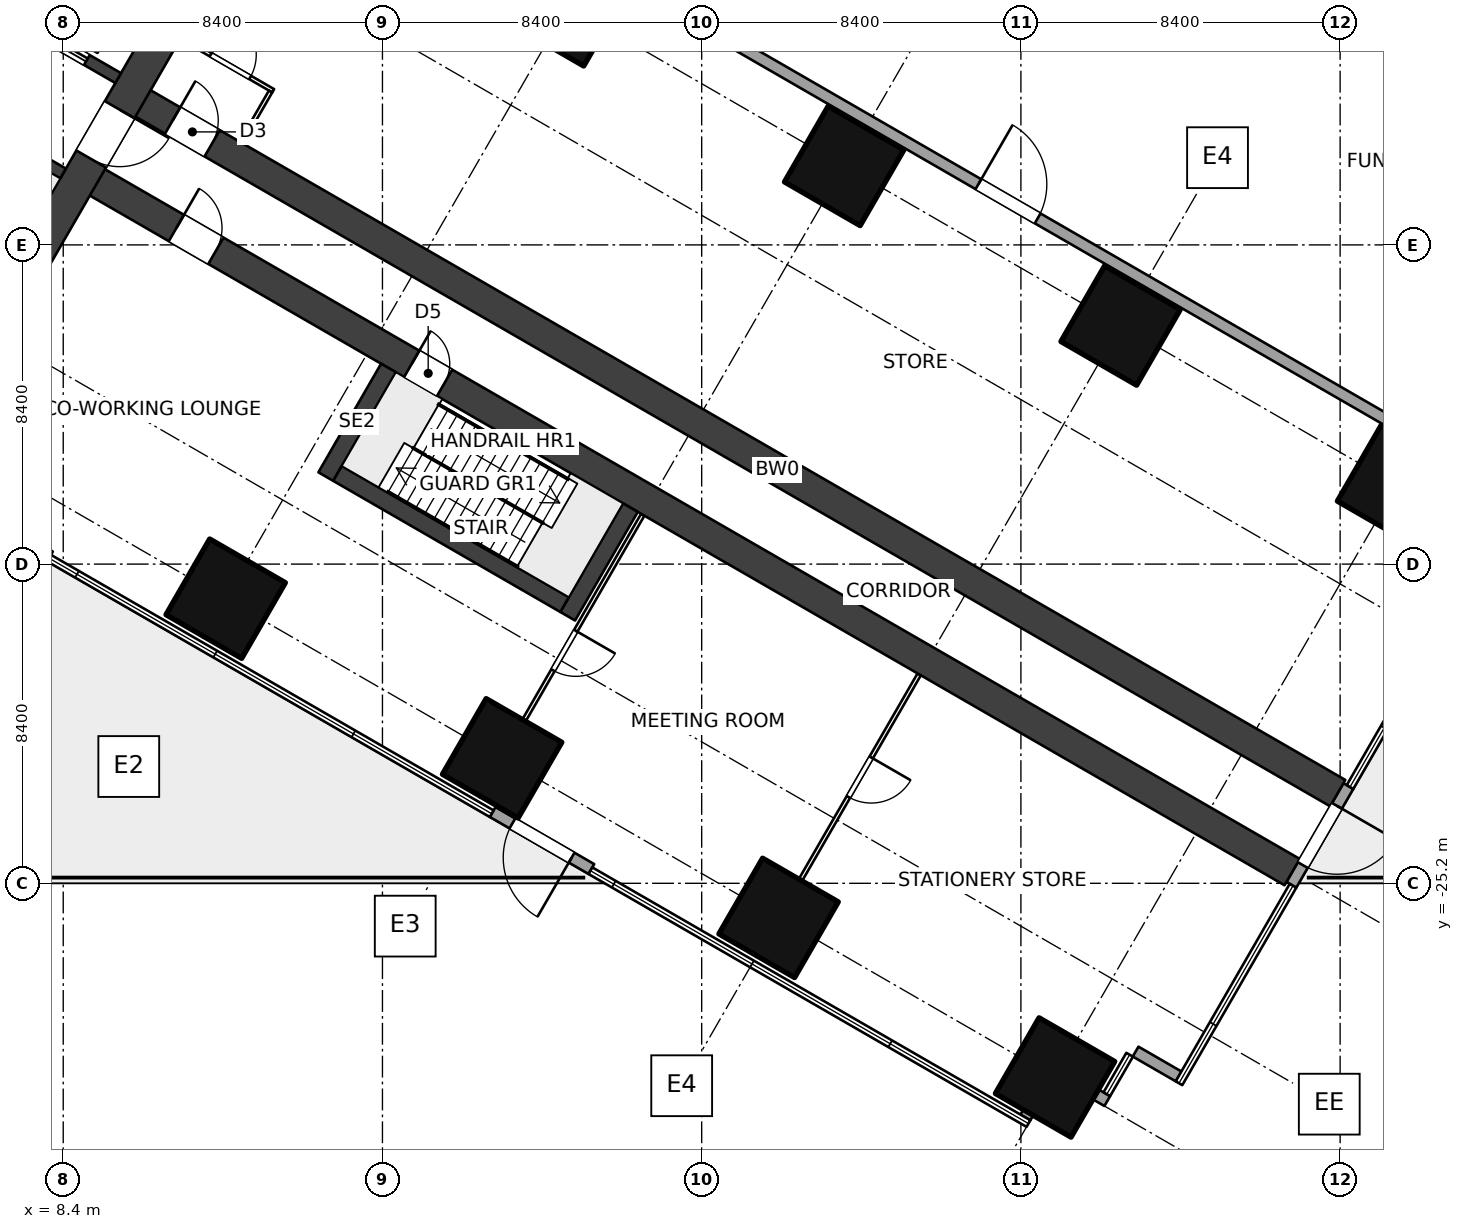
"""IFC4 building model, lengths in metres.
Left out: names, types, materials, properties, quantities, classifications, styles, units other than length and angle.
Written with IfcOpenShell. Run it as: python <this file> out.ifc"""

import sys

from ifc_helpers import new_model, si_unit, direction, frame, frame_2d, origin, origin_2d, place, context, subcontext, project, spatial, rectangle, extrude, element, fill, save


model = new_model("IFC4")
c1 = context("Model", 3, precision=1e-05, world=origin(), true_north=direction((0.0, 1.0)))
c2 = subcontext(c1, "Body", "Model", "MODEL_VIEW")
j1 = project(units=[si_unit("LENGTHUNIT", "METRE"), si_unit("PLANEANGLEUNIT", "RADIAN")], contexts=[c1])
p1 = place(None, origin())
s1 = spatial("IfcSite", under=j1, at=p1, CompositionType="ELEMENT")
p2 = place(p1, origin())
s2 = spatial("IfcBuilding", under=s1, at=p2, CompositionType="ELEMENT")
p3 = place(p2, frame((0.0, 0.0, 16.0)))
s3 = spatial("IfcBuildingStorey", under=s2, at=p3, CompositionType="ELEMENT", Elevation=16.0)
for number, where, z_axis, x_axis in (
    (1, (21.675, -2.122, 0.0), (0.0, 0.0, 1.0), (-0.5, -0.866, 0.0)),
    (2, (12.675, -17.71, 0.0), (0.0, 0.0, 1.0), (-0.5, -0.866, 0.0)),
    (3, (28.949, -6.322, 0.0), (0.0, 0.0, 1.0), (-0.5, -0.866, 0.0)),
    (4, (19.949, -21.91, 0.0), (0.0, 0.0, 1.0), (-0.5, -0.866, 0.0)),
    (5, (36.224, -10.521, 0.0), (0.0, 0.0, 1.0), (-0.5, -0.866, 0.0)),
    (6, (27.224, -26.11, 0.0), (0.0, 0.0, 1.0), (-0.5, -0.866, 0.0)),
    (7, (43.499, -14.721, 0.0), (0.0, 0.0, 1.0), (-0.5, -0.866, 0.0)),
    (8, (34.499, -30.31, 0.0), (0.0, 0.0, 1.0), (-0.5, -0.866, 0.0)),
):
    element("IfcColumn", number, at=place(p3, frame(where, z_axis=z_axis, x_axis=x_axis)), inside=s3, PredefinedType="COLUMN", context=c2, shape_type="SweptSolid", body=[
        extrude(rectangle(XDim=2.3, YDim=2.3, at=origin_2d()), origin(), (0.0, 0.0, 1.0), 5.0),
    ])
p4 = place(p3, frame((12.551, -0.225, 0.0), z_axis=(0.0, 0.0, 1.0), x_axis=(-0.499997612506, -0.8660267822, 0.0)))
e9 = element("IfcWall", 9, at=p4, inside=s3, PredefinedType="SHEAR", context=c2, shape_type="SweptSolid", body=[
    extrude(rectangle(XDim=12.161, YDim=0.9, at=frame_2d((6.08, 0.0))), origin(), (0.0, 0.0, 1.0), 5.0),
])
p5 = place(p4, frame((5.33, 0.0, 0.0)))
e10 = element("IfcOpeningElement", 10, at=p5, cuts=e9, PredefinedType="OPENING", context=c2, shape_type="SweptSolid", body=[
    extrude(rectangle(XDim=1.5, YDim=2.1, at=frame_2d((0.75, 1.05))), frame((0.0, 0.46, 0.0), z_axis=(0.0, -1.0, 0.0), x_axis=(1.0, 0.0, 0.0)), (0.0, 0.0, 1.0), 0.92),
])
p6 = place(p3, frame((2.419, -3.071, 0.0), z_axis=(0.0, 0.0, 1.0), x_axis=(0.86602711848, -0.499997030048, 0.0)))
e11 = element("IfcWall", 11, at=p6, inside=s3, PredefinedType="SHEAR", context=c2, shape_type="SweptSolid", body=[
    extrude(rectangle(XDim=6.901, YDim=0.3, at=frame_2d((3.451, 0.0))), origin(), (0.0, 0.0, 1.0), 5.0),
])
p7 = place(p6, frame((0.25, 0.0, 0.0)))
e12 = element("IfcOpeningElement", 12, at=p7, cuts=e11, PredefinedType="OPENING", context=c2, shape_type="SweptSolid", body=[
    extrude(rectangle(XDim=1.0, YDim=2.1, at=frame_2d((0.5, 1.05))), frame((0.0, 0.16, 0.0), z_axis=(0.0, -1.0, 0.0), x_axis=(1.0, 0.0, 0.0)), (0.0, 0.0, 1.0), 0.32),
])
p8 = place(p3, frame((3.869, -0.559, 0.0), z_axis=(0.0, 0.0, 1.0), x_axis=(0.86602711848, -0.499997030048, 0.0)))
e13 = element("IfcWall", 13, at=p8, inside=s3, PredefinedType="SHEAR", context=c2, shape_type="SweptSolid", body=[
    extrude(rectangle(XDim=6.901, YDim=0.3, at=frame_2d((3.451, 0.0))), origin(), (0.0, 0.0, 1.0), 5.0),
])
p9 = place(p8, frame((4.85, 0.0, 0.0)))
e14 = element("IfcOpeningElement", 14, at=p9, cuts=e13, PredefinedType="OPENING", context=c2, shape_type="SweptSolid", body=[
    extrude(rectangle(XDim=1.1, YDim=2.1, at=frame_2d((0.55, 1.05))), frame((0.0, 0.16, 0.0), z_axis=(0.0, -1.0, 0.0), x_axis=(1.0, 0.0, 0.0)), (0.0, 0.0, 1.0), 0.32),
])
p10 = place(p3, frame((10.11, -4.451, 0.0), z_axis=(0.0, 0.0, 1.0), x_axis=(0.866025284237, -0.500000207062, 0.0)))
e15 = element("IfcWall", 15, at=p10, inside=s3, PredefinedType="SHEAR", context=c2, shape_type="SweptSolid", body=[
    extrude(rectangle(XDim=36.75, YDim=0.8, at=frame_2d((18.375, 0.0))), origin(), (0.0, 0.0, 1.0), 5.0),
])
p11 = place(p10, frame((1.35, 0.0, 0.0)))
e16 = element("IfcOpeningElement", 16, at=p11, cuts=e15, PredefinedType="OPENING", context=c2, shape_type="SweptSolid", body=[
    extrude(rectangle(XDim=1.2, YDim=2.1, at=frame_2d((0.6, 1.05))), frame((0.0, 0.41, 0.0), z_axis=(0.0, -1.0, 0.0), x_axis=(1.0, 0.0, 0.0)), (0.0, 0.0, 1.0), 0.82),
])
p12 = place(p3, frame((8.91, -6.53, 0.0), z_axis=(0.0, 0.0, 1.0), x_axis=(0.866025284237, -0.500000207062, 0.0)))
e17 = element("IfcWall", 17, at=p12, inside=s3, PredefinedType="SHEAR", context=c2, shape_type="SweptSolid", body=[
    extrude(rectangle(XDim=36.75, YDim=0.8, at=frame_2d((18.375, 0.0))), origin(), (0.0, 0.0, 1.0), 5.0),
])
p13 = place(p12, frame((10.0, 0.0, 0.0)))
e18 = element("IfcOpeningElement", 18, at=p13, cuts=e17, PredefinedType="OPENING", context=c2, shape_type="SweptSolid", body=[
    extrude(rectangle(XDim=1.0, YDim=2.1, at=frame_2d((0.5, 1.05))), frame((0.0, 0.41, 0.0), z_axis=(0.0, -1.0, 0.0), x_axis=(1.0, 0.0, 0.0)), (0.0, 0.0, 1.0), 0.82),
])
p14 = place(p12, frame((2.85, 0.0, 0.0)))
e19 = element("IfcOpeningElement", 19, at=p14, cuts=e17, PredefinedType="OPENING", context=c2, shape_type="SweptSolid", body=[
    extrude(rectangle(XDim=1.2, YDim=2.1, at=frame_2d((0.6, 1.05))), frame((0.0, 0.41, 0.0), z_axis=(0.0, -1.0, 0.0), x_axis=(1.0, 0.0, 0.0)), (0.0, 0.0, 1.0), 0.82),
])
p15 = place(p3, frame((42.217, -22.642, 0.0), z_axis=(0.0, 0.0, 1.0), x_axis=(-0.50002537861, -0.866010750942, 0.0)))
e20 = element("IfcWall", 20, at=p15, inside=s3, PredefinedType="SOLIDWALL", context=c2, shape_type="SweptSolid", body=[
    extrude(rectangle(XDim=3.0, YDim=0.3, at=frame_2d((1.5, 0.0))), origin(), (0.0, 0.0, 1.0), 4.7),
])
p16 = place(p15, frame((0.6, 0.0, 0.0)))
e21 = element("IfcOpeningElement", 21, at=p16, cuts=e20, PredefinedType="OPENING", context=c2, shape_type="SweptSolid", body=[
    extrude(rectangle(XDim=1.8, YDim=2.4, at=frame_2d((0.9, 1.2))), frame((0.0, 0.16, 0.0), z_axis=(0.0, -1.0, 0.0), x_axis=(1.0, 0.0, 0.0)), (0.0, 0.0, 1.0), 0.32),
])
p17 = place(p3, frame((37.753, -30.283, 0.0), z_axis=(0.0, 0.0, 1.0), x_axis=(-0.866101796549, 0.4998676605, 0.0)))
e22 = element("IfcWall", 22, at=p17, inside=s3, PredefinedType="SOLIDWALL", context=c2, shape_type="SweptSolid", body=[
    extrude(rectangle(XDim=1.31, YDim=0.3, at=frame_2d((0.655, 0.0))), origin(), (0.0, 0.0, 1.0), 4.7),
])
p18 = place(p3, frame((35.873, -30.93, 0.0), z_axis=(0.0, 0.0, 1.0), x_axis=(-0.865939549016, 0.500148675346, 0.0)))
e23 = element("IfcWall", 23, at=p18, inside=s3, PredefinedType="SOLIDWALL", context=c2, shape_type="SweptSolid", body=[
    extrude(rectangle(XDim=0.347, YDim=0.3, at=frame_2d((0.174, 0.0))), origin(), (0.0, 0.0, 1.0), 4.7),
])
p19 = place(p3, frame((34.219, -30.495, 0.0), z_axis=(0.0, 0.0, 1.0), x_axis=(-0.499953773667, -0.866052090925, 0.0)))
e24 = element("IfcWall", 24, at=p19, inside=s3, PredefinedType="SOLIDWALL", context=c2, shape_type="SweptSolid", body=[
    extrude(rectangle(XDim=1.005, YDim=0.3, at=frame_2d((0.502, 0.0))), origin(), (0.0, 0.0, 1.0), 4.7),
])
p20 = place(p3, frame((22.298, -24.825, 0.0), z_axis=(0.0, 0.0, 1.0), x_axis=(-0.866031096941, 0.499990139034, 0.0)))
e25 = element("IfcWall", 25, at=p20, inside=s3, PredefinedType="SOLIDWALL", context=c2, shape_type="SweptSolid", body=[
    extrude(rectangle(XDim=3.0, YDim=0.3, at=frame_2d((1.5, 0.0))), origin(), (0.0, 0.0, 1.0), 4.7),
])
p21 = place(p20, frame((0.6, 0.0, 0.0)))
e26 = element("IfcOpeningElement", 26, at=p21, cuts=e25, PredefinedType="OPENING", context=c2, shape_type="SweptSolid", body=[
    extrude(rectangle(XDim=1.8, YDim=2.4, at=frame_2d((0.9, 1.2))), frame((0.0, 0.16, 0.0), z_axis=(0.0, -1.0, 0.0), x_axis=(1.0, 0.0, 0.0)), (0.0, 0.0, 1.0), 0.32),
])
p22 = place(p3, frame((11.5, -2.945, 0.0), z_axis=(0.0, 0.0, 1.0), x_axis=(0.866034573852, -0.49998411664, 0.0)))
e27 = element("IfcWall", 27, at=p22, inside=s3, PredefinedType="PARTITIONING", context=c2, shape_type="SweptSolid", body=[
    extrude(rectangle(XDim=2.8, YDim=0.1, at=frame_2d((1.4, 0.0))), origin(), (0.0, 0.0, 1.0), 4.7),
])
p23 = place(p22, frame((0.9, 0.0, 0.0)))
e28 = element("IfcOpeningElement", 28, at=p23, cuts=e27, PredefinedType="OPENING", context=c2, shape_type="SweptSolid", body=[
    extrude(rectangle(XDim=1.2, YDim=2.1, at=frame_2d((0.6, 1.05))), frame((0.0, 0.06, 0.0), z_axis=(0.0, -1.0, 0.0), x_axis=(1.0, 0.0, 0.0)), (0.0, 0.0, 1.0), 0.12),
])
p24 = place(p3, frame((13.082, -5.705, 0.0), z_axis=(0.0, 0.0, 1.0), x_axis=(0.500086022567, 0.865975732936, 0.0)))
e29 = element("IfcWall", 29, at=p24, inside=s3, PredefinedType="PARTITIONING", context=c2, shape_type="SweptSolid", body=[
    extrude(rectangle(XDim=1.55, YDim=0.1, at=frame_2d((0.775, 0.0))), origin(), (0.0, 0.0, 1.0), 4.7),
])
p25 = place(p3, frame((23.649, -15.501, 0.0), z_axis=(0.0, 0.0, 1.0), x_axis=(-0.500004234368, -0.866022959057, 0.0)))
e30 = element("IfcWall", 30, at=p25, inside=s3, PredefinedType="PARTITIONING", context=c2, shape_type="SweptSolid", body=[
    extrude(rectangle(XDim=6.25, YDim=0.1, at=frame_2d((3.125, 0.0))), origin(), (0.0, 0.0, 1.0), 2.9),
])
p26 = place(p25, frame((3.525, 0.0, 0.0)))
e31 = element("IfcOpeningElement", 31, at=p26, cuts=e30, PredefinedType="OPENING", context=c2, shape_type="SweptSolid", body=[
    extrude(rectangle(XDim=1.2, YDim=2.1, at=frame_2d((0.6, 1.05))), frame((0.0, 0.06, 0.0), z_axis=(0.0, -1.0, 0.0), x_axis=(1.0, 0.0, 0.0)), (0.0, 0.0, 1.0), 0.12),
])
p27 = place(p3, frame((30.924, -19.701, 0.0), z_axis=(0.0, 0.0, 1.0), x_axis=(-0.500004234368, -0.866022959057, 0.0)))
e32 = element("IfcWall", 32, at=p27, inside=s3, PredefinedType="PARTITIONING", context=c2, shape_type="SweptSolid", body=[
    extrude(rectangle(XDim=6.25, YDim=0.1, at=frame_2d((3.125, 0.0))), origin(), (0.0, 0.0, 1.0), 2.9),
])
p28 = place(p27, frame((2.525, 0.0, 0.0)))
e33 = element("IfcOpeningElement", 33, at=p28, cuts=e32, PredefinedType="OPENING", context=c2, shape_type="SweptSolid", body=[
    extrude(rectangle(XDim=1.2, YDim=2.1, at=frame_2d((0.6, 1.05))), frame((0.0, 0.06, 0.0), z_axis=(0.0, -1.0, 0.0), x_axis=(1.0, 0.0, 0.0)), (0.0, 0.0, 1.0), 0.12),
])
p29 = place(p3, frame((9.45, 6.495, 0.0), z_axis=(0.0, 0.0, 1.0), x_axis=(0.866025301493, -0.500000177174, 0.0)))
e34 = element("IfcWall", 34, at=p29, inside=s3, PredefinedType="SOLIDWALL", context=c2, shape_type="SweptSolid", body=[
    extrude(rectangle(XDim=43.095, YDim=0.3, at=frame_2d((21.548, 0.0))), origin(), (0.0, 0.0, 1.0), 4.7),
])
p30 = place(p29, frame((26.595, 0.0, 0.0)))
e35 = element("IfcOpeningElement", 35, at=p30, cuts=e34, PredefinedType="OPENING", context=c2, shape_type="SweptSolid", body=[
    extrude(rectangle(XDim=1.8, YDim=2.4, at=frame_2d((0.9, 1.2))), frame((0.0, 0.16, 0.0), z_axis=(0.0, -1.0, 0.0), x_axis=(1.0, 0.0, 0.0)), (0.0, 0.0, 1.0), 0.32),
])
p31 = place(p3, frame((-0.9, -11.432, 0.0), z_axis=(0.0, 0.0, 1.0), x_axis=(0.866022359356, -0.500005273068, 0.0)))
e36 = element("IfcWall", 36, at=p31, inside=s3, PredefinedType="SOLIDWALL", context=c2, shape_type="SweptSolid", body=[
    extrude(rectangle(XDim=10.337, YDim=0.3, at=frame_2d((5.168, 0.0))), origin(), (0.0, 0.0, 1.0), 4.7),
])
p32 = place(p31, frame((7.717, 0.0, 0.0)))
e37 = element("IfcOpeningElement", 37, at=p32, cuts=e36, PredefinedType="OPENING", context=c2, shape_type="SweptSolid", body=[
    extrude(rectangle(XDim=1.8, YDim=2.4, at=frame_2d((0.9, 1.2))), frame((0.0, 0.16, 0.0), z_axis=(0.0, -1.0, 0.0), x_axis=(1.0, 0.0, 0.0)), (0.0, 0.0, 1.0), 0.32),
])
for number, where, z_axis, x_axis in (
    (38, (16.959, -11.639, 0.0), (0.0, 0.0, 1.0), (-0.5, -0.866, 0.0)),
    (39, (23.324, -15.314, 0.0), (0.0, 0.0, 1.0), (-0.5, -0.866, 0.0)),
):
    element("IfcWall", number, at=place(p3, frame(where, z_axis=z_axis, x_axis=x_axis)), inside=s3, PredefinedType="SOLIDWALL", context=c2, shape_type="SweptSolid", body=[
        extrude(rectangle(XDim=3.3, YDim=0.45, at=frame_2d((1.65, 0.0))), origin(), (0.0, 0.0, 1.0), 5.0),
    ])
p33 = place(p3, frame((15.616, -14.415, 0.0), z_axis=(0.0, 0.0, 1.0), x_axis=(0.866028853923, -0.499994024137, 0.0)))
e40 = element("IfcWall", 40, at=p33, inside=s3, PredefinedType="SOLIDWALL", context=c2, shape_type="SweptSolid", body=[
    extrude(rectangle(XDim=6.9, YDim=0.45, at=frame_2d((3.45, 0.0))), origin(), (0.0, 0.0, 1.0), 5.0),
])
p34 = place(p16, origin())
e41 = element("IfcDoor", 41, at=p34, inside=s3, OperationType="DOUBLE_DOOR_SINGLE_SWING", PredefinedType="DOOR", context=c2, shape_type="SweptSolid", body=[
    extrude(rectangle(XDim=1.8, YDim=2.4, at=frame_2d((0.9, 1.2))), frame((0.0, 0.025, 0.0), z_axis=(0.0, -1.0, 0.0), x_axis=(1.0, 0.0, 0.0)), (0.0, 0.0, 1.0), 0.05),
])
fill(e21, e41)
p35 = place(p21, origin())
e42 = element("IfcDoor", 42, at=p35, inside=s3, OperationType="DOUBLE_DOOR_SINGLE_SWING", PredefinedType="DOOR", context=c2, shape_type="SweptSolid", body=[
    extrude(rectangle(XDim=1.8, YDim=2.4, at=frame_2d((0.9, 1.2))), frame((0.0, 0.025, 0.0), z_axis=(0.0, -1.0, 0.0), x_axis=(1.0, 0.0, 0.0)), (0.0, 0.0, 1.0), 0.05),
])
fill(e26, e42)
p36 = place(p9, origin())
e43 = element("IfcDoor", 43, at=p36, inside=s3, OperationType="DOUBLE_DOOR_SLIDING", PredefinedType="DOOR", context=c2, shape_type="SweptSolid", body=[
    extrude(rectangle(XDim=1.1, YDim=2.1, at=frame_2d((0.55, 1.05))), frame((0.0, 0.025, 0.0), z_axis=(0.0, -1.0, 0.0), x_axis=(1.0, 0.0, 0.0)), (0.0, 0.0, 1.0), 0.05),
])
fill(e14, e43)
p37 = place(p5, origin())
e44 = element("IfcDoor", 44, at=p37, inside=s3, OperationType="DOUBLE_DOOR_DOUBLE_SWING", PredefinedType="DOOR", context=c2, shape_type="SweptSolid", body=[
    extrude(rectangle(XDim=1.5, YDim=2.1, at=frame_2d((0.75, 1.05))), frame((0.0, 0.025, 0.0), z_axis=(0.0, -1.0, 0.0), x_axis=(1.0, 0.0, 0.0)), (0.0, 0.0, 1.0), 0.05),
])
fill(e10, e44)
p38 = place(p13, origin())
e45 = element("IfcDoor", 45, at=p38, inside=s3, OperationType="SINGLE_SWING_LEFT", PredefinedType="DOOR", context=c2, shape_type="SweptSolid", body=[
    extrude(rectangle(XDim=1.0, YDim=2.1, at=frame_2d((0.5, 1.05))), frame((0.0, 0.025, 0.0), z_axis=(0.0, -1.0, 0.0), x_axis=(1.0, 0.0, 0.0)), (0.0, 0.0, 1.0), 0.05),
])
fill(e18, e45)
p39 = place(p11, origin())
e46 = element("IfcDoor", 46, at=p39, inside=s3, OperationType="DOUBLE_SWING_LEFT", PredefinedType="DOOR", context=c2, shape_type="SweptSolid", body=[
    extrude(rectangle(XDim=1.2, YDim=2.1, at=frame_2d((0.6, 1.05))), frame((0.0, 0.025, 0.0), z_axis=(0.0, -1.0, 0.0), x_axis=(1.0, 0.0, 0.0)), (0.0, 0.0, 1.0), 0.05),
])
fill(e16, e46)
p40 = place(p23, origin())
e47 = element("IfcDoor", 47, at=p40, inside=s3, OperationType="DOUBLE_SWING_LEFT", PredefinedType="DOOR", context=c2, shape_type="SweptSolid", body=[
    extrude(rectangle(XDim=1.2, YDim=2.1, at=frame_2d((0.6, 1.05))), frame((0.0, 0.025, 0.0), z_axis=(0.0, -1.0, 0.0), x_axis=(1.0, 0.0, 0.0)), (0.0, 0.0, 1.0), 0.05),
])
fill(e28, e47)
p41 = place(p26, origin())
e48 = element("IfcDoor", 48, at=p41, inside=s3, OperationType="DOUBLE_SWING_LEFT", PredefinedType="DOOR", context=c2, shape_type="SweptSolid", body=[
    extrude(rectangle(XDim=1.2, YDim=2.1, at=frame_2d((0.6, 1.05))), frame((0.0, 0.025, 0.0), z_axis=(0.0, -1.0, 0.0), x_axis=(1.0, 0.0, 0.0)), (0.0, 0.0, 1.0), 0.05),
])
fill(e31, e48)
p42 = place(p28, origin())
e49 = element("IfcDoor", 49, at=p42, inside=s3, OperationType="DOUBLE_SWING_LEFT", PredefinedType="DOOR", context=c2, shape_type="SweptSolid", body=[
    extrude(rectangle(XDim=1.2, YDim=2.1, at=frame_2d((0.6, 1.05))), frame((0.0, 0.025, 0.0), z_axis=(0.0, -1.0, 0.0), x_axis=(1.0, 0.0, 0.0)), (0.0, 0.0, 1.0), 0.05),
])
fill(e33, e49)
p43 = place(p14, origin())
e50 = element("IfcDoor", 50, at=p43, inside=s3, OperationType="DOUBLE_SWING_LEFT", PredefinedType="DOOR", context=c2, shape_type="SweptSolid", body=[
    extrude(rectangle(XDim=1.2, YDim=2.1, at=frame_2d((0.6, 1.05))), frame((0.0, 0.025, 0.0), z_axis=(0.0, -1.0, 0.0), x_axis=(1.0, 0.0, 0.0)), (0.0, 0.0, 1.0), 0.05),
])
fill(e19, e50)
p44 = place(p30, origin())
e51 = element("IfcDoor", 51, at=p44, inside=s3, OperationType="DOUBLE_DOOR_DOUBLE_SWING", PredefinedType="DOOR", context=c2, shape_type="SweptSolid", body=[
    extrude(rectangle(XDim=1.8, YDim=2.4, at=frame_2d((0.9, 1.2))), frame((0.0, 0.025, 0.0), z_axis=(0.0, -1.0, 0.0), x_axis=(1.0, 0.0, 0.0)), (0.0, 0.0, 1.0), 0.05),
])
fill(e35, e51)
save(model, sys.argv[1])
